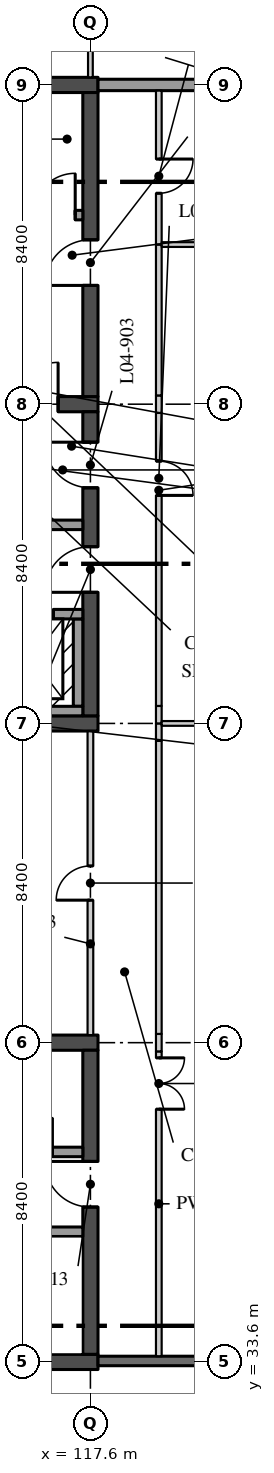
"""IFC4 building model, lengths in metres.
Left out: names, types, materials, properties, quantities, classifications, styles, units other than length and angle.
Written with IfcOpenShell. Run it as: python <this file> out.ifc"""

import sys

from ifc_helpers import new_model, si_unit, direction, frame, frame_2d, origin, place, context, subcontext, project, spatial, rectangle, extrude, element, fill, save


model = new_model("IFC4")
c1 = context("Model", 3, precision=1e-05, world=origin(), true_north=direction((0.0, 1.0)))
c2 = subcontext(c1, "Body", "Model", "MODEL_VIEW")
j1 = project(units=[si_unit("LENGTHUNIT", "METRE"), si_unit("PLANEANGLEUNIT", "RADIAN")], contexts=[c1])
p1 = place(None, origin())
s1 = spatial("IfcSite", under=j1, at=p1, CompositionType="ELEMENT")
p2 = place(p1, origin())
s2 = spatial("IfcBuilding", under=s1, at=p2, CompositionType="ELEMENT")
p3 = place(p2, frame((0.0, 0.0, 18.9)))
s3 = spatial("IfcBuildingStorey", under=s2, at=p3, CompositionType="ELEMENT", Elevation=18.9)
p4 = place(p3, frame((109.0, 50.4, 0.0), z_axis=(0.0, 0.0, 1.0), x_axis=(1.0, 0.0, 0.0)))
e1 = element("IfcWall", 1, at=p4, inside=s3, PredefinedType="SHEAR", context=c2, shape_type="SweptSolid", body=[
    extrude(rectangle(XDim=8.8, YDim=0.4, at=frame_2d((4.4, 0.0))), origin(), (0.0, 0.0, 1.0), 4.37),
])
p5 = place(p3, frame((109.0, 58.8, 0.0), z_axis=(0.0, 0.0, 1.0), x_axis=(1.0, 0.0, 0.0)))
e2 = element("IfcWall", 2, at=p5, inside=s3, PredefinedType="SHEAR", context=c2, shape_type="SweptSolid", body=[
    extrude(rectangle(XDim=8.8, YDim=0.4, at=frame_2d((4.4, 0.0))), origin(), (0.0, 0.0, 1.0), 4.37),
])
p6 = place(p5, frame((6.65, 0.0, 0.0)))
e3 = element("IfcOpeningElement", 3, at=p6, cuts=e2, PredefinedType="OPENING", context=c2, shape_type="SweptSolid", body=[
    extrude(rectangle(XDim=1.1, YDim=2.1, at=frame_2d((0.55, 1.05))), frame((0.0, 0.21, 0.0), z_axis=(0.0, -1.0, 0.0), x_axis=(1.0, 0.0, 0.0)), (0.0, 0.0, 1.0), 0.42),
])
p7 = place(p3, frame((117.6, 50.6, 0.0), z_axis=(0.0, 0.0, 1.0), x_axis=(0.0, 1.0, 0.0)))
e4 = element("IfcWall", 4, at=p7, inside=s3, PredefinedType="SHEAR", context=c2, shape_type="SweptSolid", body=[
    extrude(rectangle(XDim=8.0, YDim=0.4, at=frame_2d((4.0, 0.0))), origin(), (0.0, 0.0, 1.0), 4.37),
])
p8 = place(p7, frame((3.25, 0.0, 0.0)))
e5 = element("IfcOpeningElement", 5, at=p8, cuts=e4, PredefinedType="OPENING", context=c2, shape_type="SweptSolid", body=[
    extrude(rectangle(XDim=1.2, YDim=2.1, at=frame_2d((0.6, 1.05))), frame((0.0, 0.21, 0.0), z_axis=(0.0, -1.0, 0.0), x_axis=(1.0, 0.0, 0.0)), (0.0, 0.0, 1.0), 0.42),
])
p9 = place(p7, frame((6.0, 0.0, 0.0)))
e6 = element("IfcOpeningElement", 6, at=p9, cuts=e4, PredefinedType="OPENING", context=c2, shape_type="SweptSolid", body=[
    extrude(rectangle(XDim=1.2, YDim=2.1, at=frame_2d((0.6, 1.05))), frame((0.0, 0.21, 0.0), z_axis=(0.0, -1.0, 0.0), x_axis=(1.0, 0.0, 0.0)), (0.0, 0.0, 1.0), 0.42),
])
p10 = place(p3, frame((114.75, 55.625, 0.0), z_axis=(0.0, 0.0, 1.0), x_axis=(1.0, 0.0, 0.0)))
e7 = element("IfcWall", 7, at=p10, inside=s3, PredefinedType="SOLIDWALL", context=c2, shape_type="SweptSolid", body=[
    extrude(rectangle(XDim=2.65, YDim=0.25, at=frame_2d((1.325, 0.0))), origin(), (0.0, 0.0, 1.0), 4.37),
])
p11 = place(p3, frame((109.0, 67.2, 0.0), z_axis=(0.0, 0.0, 1.0), x_axis=(1.0, 0.0, 0.0)))
e8 = element("IfcWall", 8, at=p11, inside=s3, PredefinedType="SHEAR", context=c2, shape_type="SweptSolid", body=[
    extrude(rectangle(XDim=8.8, YDim=0.4, at=frame_2d((4.4, 0.0))), origin(), (0.0, 0.0, 1.0), 4.37),
])
p12 = place(p3, frame((117.6, 59.0, 0.0), z_axis=(0.0, 0.0, 1.0), x_axis=(0.0, 1.0, 0.0)))
e9 = element("IfcWall", 9, at=p12, inside=s3, PredefinedType="SHEAR", context=c2, shape_type="SweptSolid", body=[
    extrude(rectangle(XDim=8.0, YDim=0.4, at=frame_2d((4.0, 0.0))), origin(), (0.0, 0.0, 1.0), 4.37),
])
p13 = place(p12, frame((2.925, 0.0, 0.0)))
e10 = element("IfcOpeningElement", 10, at=p13, cuts=e9, PredefinedType="OPENING", context=c2, shape_type="SweptSolid", body=[
    extrude(rectangle(XDim=1.2, YDim=2.1, at=frame_2d((0.6, 1.05))), frame((0.0, 0.21, 0.0), z_axis=(0.0, -1.0, 0.0), x_axis=(1.0, 0.0, 0.0)), (0.0, 0.0, 1.0), 0.42),
])
p14 = place(p3, frame((117.4, 63.775, 0.0), z_axis=(0.0, 0.0, 1.0), x_axis=(-1.0, 0.0, 0.0)))
e11 = element("IfcWall", 11, at=p14, inside=s3, PredefinedType="SOLIDWALL", context=c2, shape_type="SweptSolid", body=[
    extrude(rectangle(XDim=8.0, YDim=0.25, at=frame_2d((4.0, 0.0))), origin(), (0.0, 0.0, 1.0), 4.37),
])
p15 = place(p14, frame((0.2, 0.0, 0.0)))
e12 = element("IfcOpeningElement", 12, at=p15, cuts=e11, PredefinedType="OPENING", context=c2, shape_type="SweptSolid", body=[
    extrude(rectangle(XDim=1.1, YDim=2.1, at=frame_2d((0.55, 1.05))), frame((0.0, 0.135, 0.0), z_axis=(0.0, -1.0, 0.0), x_axis=(1.0, 0.0, 0.0)), (0.0, 0.0, 1.0), 0.27),
])
for number, where, z_axis, x_axis in (
    (13, (109.0, 33.6, 0.0), (0.0, 0.0, 1.0), (1.0, 0.0, 0.0)),
    (14, (109.0, 42.0, 0.0), (0.0, 0.0, 1.0), (1.0, 0.0, 0.0)),
):
    element("IfcWall", number, at=place(p3, frame(where, z_axis=z_axis, x_axis=x_axis)), inside=s3, PredefinedType="SHEAR", context=c2, shape_type="SweptSolid", body=[
        extrude(rectangle(XDim=8.8, YDim=0.4, at=frame_2d((4.4, 0.0))), origin(), (0.0, 0.0, 1.0), 4.37),
    ])
p16 = place(p3, frame((117.6, 33.8, 0.0), z_axis=(0.0, 0.0, 1.0), x_axis=(0.0, 1.0, 0.0)))
e15 = element("IfcWall", 15, at=p16, inside=s3, PredefinedType="SHEAR", context=c2, shape_type="SweptSolid", body=[
    extrude(rectangle(XDim=8.0, YDim=0.4, at=frame_2d((4.0, 0.0))), origin(), (0.0, 0.0, 1.0), 4.37),
])
p17 = place(p16, frame((3.875, 0.0, 0.0)))
e16 = element("IfcOpeningElement", 16, at=p17, cuts=e15, PredefinedType="OPENING", context=c2, shape_type="SweptSolid", body=[
    extrude(rectangle(XDim=1.2, YDim=2.1, at=frame_2d((0.6, 1.05))), frame((0.0, 0.21, 0.0), z_axis=(0.0, -1.0, 0.0), x_axis=(1.0, 0.0, 0.0)), (0.0, 0.0, 1.0), 0.42),
])
p18 = place(p3, frame((109.4, 37.025, 0.0), z_axis=(0.0, 0.0, 1.0), x_axis=(1.0, 0.0, 0.0)))
e17 = element("IfcWall", 17, at=p18, inside=s3, PredefinedType="SOLIDWALL", context=c2, shape_type="SweptSolid", body=[
    extrude(rectangle(XDim=8.0, YDim=0.25, at=frame_2d((4.0, 0.0))), origin(), (0.0, 0.0, 1.0), 4.37),
])
p19 = place(p18, frame((0.2, 0.0, 0.0)))
e18 = element("IfcOpeningElement", 18, at=p19, cuts=e17, PredefinedType="OPENING", context=c2, shape_type="SweptSolid", body=[
    extrude(rectangle(XDim=1.1, YDim=2.1, at=frame_2d((0.55, 1.05))), frame((0.0, 0.135, 0.0), z_axis=(0.0, -1.0, 0.0), x_axis=(1.0, 0.0, 0.0)), (0.0, 0.0, 1.0), 0.27),
])
p20 = place(p3, frame((112.05, 39.125, 0.0), z_axis=(0.0, 0.0, 1.0), x_axis=(1.0, 0.0, 0.0)))
e19 = element("IfcWall", 19, at=p20, inside=s3, PredefinedType="SOLIDWALL", context=c2, shape_type="SweptSolid", body=[
    extrude(rectangle(XDim=5.35, YDim=0.25, at=frame_2d((2.675, 0.0))), origin(), (0.0, 0.0, 1.0), 4.37),
])
p21 = place(p20, frame((3.65, 0.0, 0.0)))
e20 = element("IfcOpeningElement", 20, at=p21, cuts=e19, PredefinedType="OPENING", context=c2, shape_type="SweptSolid", body=[
    extrude(rectangle(XDim=0.9, YDim=2.1, at=frame_2d((0.45, 1.05))), frame((0.0, 0.135, 0.0), z_axis=(0.0, -1.0, 0.0), x_axis=(1.0, 0.0, 0.0)), (0.0, 0.0, 1.0), 0.27),
])
p22 = place(p20, frame((0.9, 0.0, 0.0)))
e21 = element("IfcOpeningElement", 21, at=p22, cuts=e19, PredefinedType="OPENING", context=c2, shape_type="SweptSolid", body=[
    extrude(rectangle(XDim=0.8, YDim=2.1, at=frame_2d((0.4, 1.05))), frame((0.0, 0.135, 0.0), z_axis=(0.0, -1.0, 0.0), x_axis=(1.0, 0.0, 0.0)), (0.0, 0.0, 1.0), 0.27),
])
p23 = place(p3, frame((117.275, 50.85, 0.0), z_axis=(0.0, 0.0, 1.0), x_axis=(0.0, 1.0, 0.0)))
e22 = element("IfcWall", 22, at=p23, inside=s3, PredefinedType="SOLIDWALL", context=c2, shape_type="SweptSolid", body=[
    extrude(rectangle(XDim=2.3, YDim=0.25, at=frame_2d((1.15, 0.0))), origin(), (0.0, 0.0, 1.0), 4.37),
])
p24 = place(p3, frame((114.75, 53.275, 0.0), z_axis=(0.0, 0.0, 1.0), x_axis=(1.0, 0.0, 0.0)))
e23 = element("IfcWall", 23, at=p24, inside=s3, PredefinedType="SOLIDWALL", context=c2, shape_type="SweptSolid", body=[
    extrude(rectangle(XDim=2.65, YDim=0.25, at=frame_2d((1.325, 0.0))), origin(), (0.0, 0.0, 1.0), 4.37),
])
p25 = place(p24, frame((0.775, 0.0, 0.0)))
e24 = element("IfcOpeningElement", 24, at=p25, cuts=e23, PredefinedType="OPENING", context=c2, shape_type="SweptSolid", body=[
    extrude(rectangle(XDim=1.1, YDim=2.1, at=frame_2d((0.55, 1.05))), frame((0.0, 0.135, 0.0), z_axis=(0.0, -1.0, 0.0), x_axis=(1.0, 0.0, 0.0)), (0.0, 0.0, 1.0), 0.27),
])
p26 = place(p3, frame((114.75, 50.725, 0.0), z_axis=(0.0, 0.0, 1.0), x_axis=(1.0, 0.0, 0.0)))
e25 = element("IfcWall", 25, at=p26, inside=s3, PredefinedType="SOLIDWALL", context=c2, shape_type="SweptSolid", body=[
    extrude(rectangle(XDim=2.65, YDim=0.25, at=frame_2d((1.325, 0.0))), origin(), (0.0, 0.0, 1.0), 4.37),
])
p27 = place(p3, frame((119.4, 33.75, 0.0), z_axis=(0.0, 0.0, 1.0), x_axis=(0.0, 1.0, 0.0)))
e26 = element("IfcWall", 26, at=p27, inside=s3, PredefinedType="PARTITIONING", context=c2, shape_type="SweptSolid", body=[
    extrude(rectangle(XDim=8.02, YDim=0.15, at=frame_2d((4.01, 0.0))), origin(), (0.0, 0.0, 1.0), 4.37),
])
p28 = place(p27, frame((6.5, 0.0, 0.0)))
e27 = element("IfcOpeningElement", 27, at=p28, cuts=e26, PredefinedType="OPENING", context=c2, shape_type="SweptSolid", body=[
    extrude(rectangle(XDim=1.35, YDim=2.1, at=frame_2d((0.675, 1.05))), frame((0.0, 0.085, 0.0), z_axis=(0.0, -1.0, 0.0), x_axis=(1.0, 0.0, 0.0)), (0.0, 0.0, 1.0), 0.17),
])
p29 = place(p3, frame((119.4, 41.77, 0.0), z_axis=(0.0, 0.0, 1.0), x_axis=(0.0, 1.0, 0.0)))
e28 = element("IfcWall", 28, at=p29, inside=s3, PredefinedType="PARTITIONING", context=c2, shape_type="SweptSolid", body=[
    extrude(rectangle(XDim=0.46, YDim=0.15, at=frame_2d((0.23, 0.0))), origin(), (0.0, 0.0, 1.0), 3.746),
])
p30 = place(p3, frame((119.4, 42.23, 0.0), z_axis=(0.0, 0.0, 1.0), x_axis=(0.0, 1.0, 0.0)))
e29 = element("IfcWall", 29, at=p30, inside=s3, PredefinedType="PARTITIONING", context=c2, shape_type="SweptSolid", body=[
    extrude(rectangle(XDim=7.71, YDim=0.15, at=frame_2d((3.855, 0.0))), origin(), (0.0, 0.0, 1.0), 4.37),
])
p31 = place(p3, frame((119.4, 49.94, 0.0), z_axis=(0.0, 0.0, 1.0), x_axis=(0.0, 1.0, 0.0)))
e30 = element("IfcWall", 30, at=p31, inside=s3, PredefinedType="PARTITIONING", context=c2, shape_type="SweptSolid", body=[
    extrude(rectangle(XDim=0.46, YDim=0.15, at=frame_2d((0.23, 0.0))), origin(), (0.0, 0.0, 1.0), 3.746),
])
p32 = place(p3, frame((119.4, 50.4, 0.0), z_axis=(0.0, 0.0, 1.0), x_axis=(0.0, 1.0, 0.0)))
e31 = element("IfcWall", 31, at=p32, inside=s3, PredefinedType="PARTITIONING", context=c2, shape_type="SweptSolid", body=[
    extrude(rectangle(XDim=0.46, YDim=0.15, at=frame_2d((0.23, 0.0))), origin(), (0.0, 0.0, 1.0), 3.746),
])
p33 = place(p3, frame((119.4, 50.86, 0.0), z_axis=(0.0, 0.0, 1.0), x_axis=(0.0, 1.0, 0.0)))
e32 = element("IfcWall", 32, at=p33, inside=s3, PredefinedType="PARTITIONING", context=c2, shape_type="SweptSolid", body=[
    extrude(rectangle(XDim=7.71, YDim=0.15, at=frame_2d((3.855, 0.0))), origin(), (0.0, 0.0, 1.0), 4.37),
])
p34 = place(p33, frame((5.54, 0.0, 0.0)))
e33 = element("IfcOpeningElement", 33, at=p34, cuts=e32, PredefinedType="OPENING", context=c2, shape_type="SweptSolid", body=[
    extrude(rectangle(XDim=0.9, YDim=2.1, at=frame_2d((0.45, 1.05))), frame((0.0, 0.085, 0.0), z_axis=(0.0, -1.0, 0.0), x_axis=(1.0, 0.0, 0.0)), (0.0, 0.0, 1.0), 0.17),
])
p35 = place(p3, frame((119.4, 58.57, 0.0), z_axis=(0.0, 0.0, 1.0), x_axis=(0.0, 1.0, 0.0)))
e34 = element("IfcWall", 34, at=p35, inside=s3, PredefinedType="PARTITIONING", context=c2, shape_type="SweptSolid", body=[
    extrude(rectangle(XDim=0.46, YDim=0.15, at=frame_2d((0.23, 0.0))), origin(), (0.0, 0.0, 1.0), 3.746),
])
p36 = place(p3, frame((119.4, 59.03, 0.0), z_axis=(0.0, 0.0, 1.0), x_axis=(0.0, 1.0, 0.0)))
e35 = element("IfcWall", 35, at=p36, inside=s3, PredefinedType="PARTITIONING", context=c2, shape_type="SweptSolid", body=[
    extrude(rectangle(XDim=3.97, YDim=0.15, at=frame_2d((1.985, 0.0))), origin(), (0.0, 0.0, 1.0), 4.37),
])
p37 = place(p3, frame((119.4, 63.0, 0.0), z_axis=(0.0, 0.0, 1.0), x_axis=(0.0, 1.0, 0.0)))
e36 = element("IfcWall", 36, at=p37, inside=s3, PredefinedType="PARTITIONING", context=c2, shape_type="SweptSolid", body=[
    extrude(rectangle(XDim=4.05, YDim=0.15, at=frame_2d((2.025, 0.0))), origin(), (0.0, 0.0, 1.0), 4.37),
])
p38 = place(p37, frame((1.35, 0.0, 0.0)))
e37 = element("IfcOpeningElement", 37, at=p38, cuts=e36, PredefinedType="OPENING", context=c2, shape_type="SweptSolid", body=[
    extrude(rectangle(XDim=0.9, YDim=2.1, at=frame_2d((0.45, 1.05))), frame((0.0, 0.085, 0.0), z_axis=(0.0, -1.0, 0.0), x_axis=(1.0, 0.0, 0.0)), (0.0, 0.0, 1.0), 0.17),
])
p39 = place(p3, frame((117.6, 42.2, 0.0), z_axis=(0.0, 0.0, 1.0), x_axis=(0.0, 1.0, 0.0)))
e38 = element("IfcWall", 38, at=p39, inside=s3, PredefinedType="PARTITIONING", context=c2, shape_type="SweptSolid", body=[
    extrude(rectangle(XDim=8.0, YDim=0.15, at=frame_2d((4.0, 0.0))), origin(), (0.0, 0.0, 1.0), 3.746),
])
p40 = place(p39, frame((3.55, 0.0, 0.0)))
e39 = element("IfcOpeningElement", 39, at=p40, cuts=e38, PredefinedType="OPENING", context=c2, shape_type="SweptSolid", body=[
    extrude(rectangle(XDim=0.9, YDim=2.1, at=frame_2d((0.45, 1.05))), frame((0.0, 0.085, 0.0), z_axis=(0.0, -1.0, 0.0), x_axis=(1.0, 0.0, 0.0)), (0.0, 0.0, 1.0), 0.17),
])
p41 = place(p3, frame((119.475, 50.4, 0.0), z_axis=(0.0, 0.0, 1.0), x_axis=(1.0, 0.0, 0.0)))
e40 = element("IfcWall", 40, at=p41, inside=s3, PredefinedType="PARTITIONING", context=c2, shape_type="SweptSolid", body=[
    extrude(rectangle(XDim=6.328, YDim=0.125, at=frame_2d((3.164, 0.0))), origin(), (0.0, 0.0, 1.0), 3.746),
])
p42 = place(p3, frame((119.475, 63.0, 0.0), z_axis=(0.0, 0.0, 1.0), x_axis=(1.0, 0.0, 0.0)))
e41 = element("IfcWall", 41, at=p42, inside=s3, PredefinedType="PARTITIONING", context=c2, shape_type="SweptSolid", body=[
    extrude(rectangle(XDim=1.118, YDim=0.125, at=frame_2d((0.559, 0.0))), origin(), (0.0, 0.0, 1.0), 3.895),
])
p43 = place(p3, frame((117.6, 67.4, 0.0), z_axis=(0.0, 0.0, 1.0), x_axis=(0.0, 1.0, 0.0)))
e42 = element("IfcWall", 42, at=p43, inside=s3, PredefinedType="PARTITIONING", context=c2, shape_type="SweptSolid", body=[
    extrude(rectangle(XDim=6.625, YDim=0.125, at=frame_2d((3.312, 0.0))), origin(), (0.0, 0.0, 1.0), 3.819),
])
p44 = place(p3, frame((117.8, 33.625, 0.0), z_axis=(0.0, 0.0, 1.0), x_axis=(1.0, 0.0, 0.0)))
e43 = element("IfcWall", 43, at=p44, inside=s3, PredefinedType="SOLIDWALL", context=c2, shape_type="SweptSolid", body=[
    extrude(rectangle(XDim=8.197, YDim=0.25, at=frame_2d((4.098, 0.0))), origin(), (0.0, 0.0, 1.0), 3.746),
])
p45 = place(p44, frame((5.2, 0.0, 0.9)))
e44 = element("IfcOpeningElement", 44, at=p45, cuts=e43, PredefinedType="OPENING", context=c2, shape_type="SweptSolid", body=[
    extrude(rectangle(XDim=1.8, YDim=2.1, at=frame_2d((0.9, 1.05))), frame((0.0, 0.135, 0.0), z_axis=(0.0, -1.0, 0.0), x_axis=(1.0, 0.0, 0.0)), (0.0, 0.0, 1.0), 0.27),
])
p46 = place(p3, frame((125.997, 67.2, 0.0), z_axis=(0.0, 0.0, 1.0), x_axis=(-1.0, 0.0, 0.0)))
e45 = element("IfcWall", 45, at=p46, inside=s3, PredefinedType="SOLIDWALL", context=c2, shape_type="SweptSolid", body=[
    extrude(rectangle(XDim=8.197, YDim=0.3, at=frame_2d((4.099, 0.0))), origin(), (0.0, 0.0, 1.0), 3.746),
])
p47 = place(p8, origin())
e46 = element("IfcDoor", 46, at=p47, inside=s3, OperationType="SINGLE_SWING_RIGHT", PredefinedType="DOOR", context=c2, shape_type="SweptSolid", body=[
    extrude(rectangle(XDim=1.2, YDim=2.1, at=frame_2d((0.6, 1.05))), frame((0.0, 0.035, 0.0), z_axis=(0.0, -1.0, 0.0), x_axis=(1.0, 0.0, 0.0)), (0.0, 0.0, 1.0), 0.07),
])
fill(e5, e46)
p48 = place(p9, origin())
e47 = element("IfcDoor", 47, at=p48, inside=s3, OperationType="SINGLE_SWING_LEFT", PredefinedType="DOOR", context=c2, shape_type="SweptSolid", body=[
    extrude(rectangle(XDim=1.2, YDim=2.1, at=frame_2d((0.6, 1.05))), frame((0.0, 0.035, 0.0), z_axis=(0.0, -1.0, 0.0), x_axis=(1.0, 0.0, 0.0)), (0.0, 0.0, 1.0), 0.07),
])
fill(e6, e47)
p49 = place(p6, origin())
e48 = element("IfcDoor", 48, at=p49, inside=s3, OperationType="SINGLE_SWING_LEFT", PredefinedType="DOOR", context=c2, shape_type="SweptSolid", body=[
    extrude(rectangle(XDim=1.1, YDim=2.1, at=frame_2d((0.55, 1.05))), frame((0.0, 0.035, 0.0), z_axis=(0.0, -1.0, 0.0), x_axis=(1.0, 0.0, 0.0)), (0.0, 0.0, 1.0), 0.07),
])
fill(e3, e48)
p50 = place(p13, origin())
e49 = element("IfcDoor", 49, at=p50, inside=s3, OperationType="SINGLE_SWING_RIGHT", PredefinedType="DOOR", context=c2, shape_type="SweptSolid", body=[
    extrude(rectangle(XDim=1.2, YDim=2.1, at=frame_2d((0.6, 1.05))), frame((0.0, 0.035, 0.0), z_axis=(0.0, -1.0, 0.0), x_axis=(1.0, 0.0, 0.0)), (0.0, 0.0, 1.0), 0.07),
])
fill(e10, e49)
p51 = place(p15, frame((1.1, 0.0, 0.0), z_axis=(0.0, 0.0, 1.0), x_axis=(-1.0, 0.0, 0.0)))
e50 = element("IfcDoor", 50, at=p51, inside=s3, OperationType="SINGLE_SWING_LEFT", PredefinedType="DOOR", context=c2, shape_type="SweptSolid", body=[
    extrude(rectangle(XDim=1.1, YDim=2.1, at=frame_2d((0.55, 1.05))), frame((0.0, 0.035, 0.0), z_axis=(0.0, -1.0, 0.0), x_axis=(1.0, 0.0, 0.0)), (0.0, 0.0, 1.0), 0.07),
])
fill(e12, e50)
p52 = place(p17, origin())
e51 = element("IfcDoor", 51, at=p52, inside=s3, OperationType="SINGLE_SWING_LEFT", PredefinedType="DOOR", context=c2, shape_type="SweptSolid", body=[
    extrude(rectangle(XDim=1.2, YDim=2.1, at=frame_2d((0.6, 1.05))), frame((0.0, 0.035, 0.0), z_axis=(0.0, -1.0, 0.0), x_axis=(1.0, 0.0, 0.0)), (0.0, 0.0, 1.0), 0.07),
])
fill(e16, e51)
p53 = place(p25, origin())
e52 = element("IfcDoor", 52, at=p53, inside=s3, OperationType="DOUBLE_DOOR_SLIDING", PredefinedType="DOOR", context=c2, shape_type="SweptSolid", body=[
    extrude(rectangle(XDim=1.1, YDim=2.1, at=frame_2d((0.55, 1.05))), frame((0.0, 0.04, 0.0), z_axis=(0.0, -1.0, 0.0), x_axis=(1.0, 0.0, 0.0)), (0.0, 0.0, 1.0), 0.08),
])
fill(e24, e52)
p54 = place(p28, frame((1.35, 0.0, 0.0), z_axis=(0.0, 0.0, 1.0), x_axis=(-1.0, 0.0, 0.0)))
e53 = element("IfcDoor", 53, at=p54, inside=s3, OperationType="DOUBLE_DOOR_SINGLE_SWING", PredefinedType="DOOR", context=c2, shape_type="SweptSolid", body=[
    extrude(rectangle(XDim=1.35, YDim=2.1, at=frame_2d((0.675, 1.05))), frame((0.0, 0.025, 0.0), z_axis=(0.0, -1.0, 0.0), x_axis=(1.0, 0.0, 0.0)), (0.0, 0.0, 1.0), 0.05),
])
fill(e27, e53)
p55 = place(p34, frame((0.9, 0.0, 0.0), z_axis=(0.0, 0.0, 1.0), x_axis=(-1.0, 0.0, 0.0)))
e54 = element("IfcDoor", 54, at=p55, inside=s3, OperationType="SINGLE_SWING_LEFT", PredefinedType="DOOR", context=c2, shape_type="SweptSolid", body=[
    extrude(rectangle(XDim=0.9, YDim=2.1, at=frame_2d((0.45, 1.05))), frame((0.0, 0.025, 0.0), z_axis=(0.0, -1.0, 0.0), x_axis=(1.0, 0.0, 0.0)), (0.0, 0.0, 1.0), 0.05),
])
fill(e33, e54)
p56 = place(p38, frame((0.9, 0.0, 0.0), z_axis=(0.0, 0.0, 1.0), x_axis=(-1.0, 0.0, 0.0)))
e55 = element("IfcDoor", 55, at=p56, inside=s3, OperationType="SINGLE_SWING_RIGHT", PredefinedType="DOOR", context=c2, shape_type="SweptSolid", body=[
    extrude(rectangle(XDim=0.9, YDim=2.1, at=frame_2d((0.45, 1.05))), frame((0.0, 0.025, 0.0), z_axis=(0.0, -1.0, 0.0), x_axis=(1.0, 0.0, 0.0)), (0.0, 0.0, 1.0), 0.05),
])
fill(e37, e55)
p57 = place(p40, origin())
e56 = element("IfcDoor", 56, at=p57, inside=s3, OperationType="SINGLE_SWING_RIGHT", PredefinedType="DOOR", context=c2, shape_type="SweptSolid", body=[
    extrude(rectangle(XDim=0.9, YDim=2.1, at=frame_2d((0.45, 1.05))), frame((0.0, 0.025, 0.0), z_axis=(0.0, -1.0, 0.0), x_axis=(1.0, 0.0, 0.0)), (0.0, 0.0, 1.0), 0.05),
])
fill(e39, e56)
save(model, sys.argv[1])
